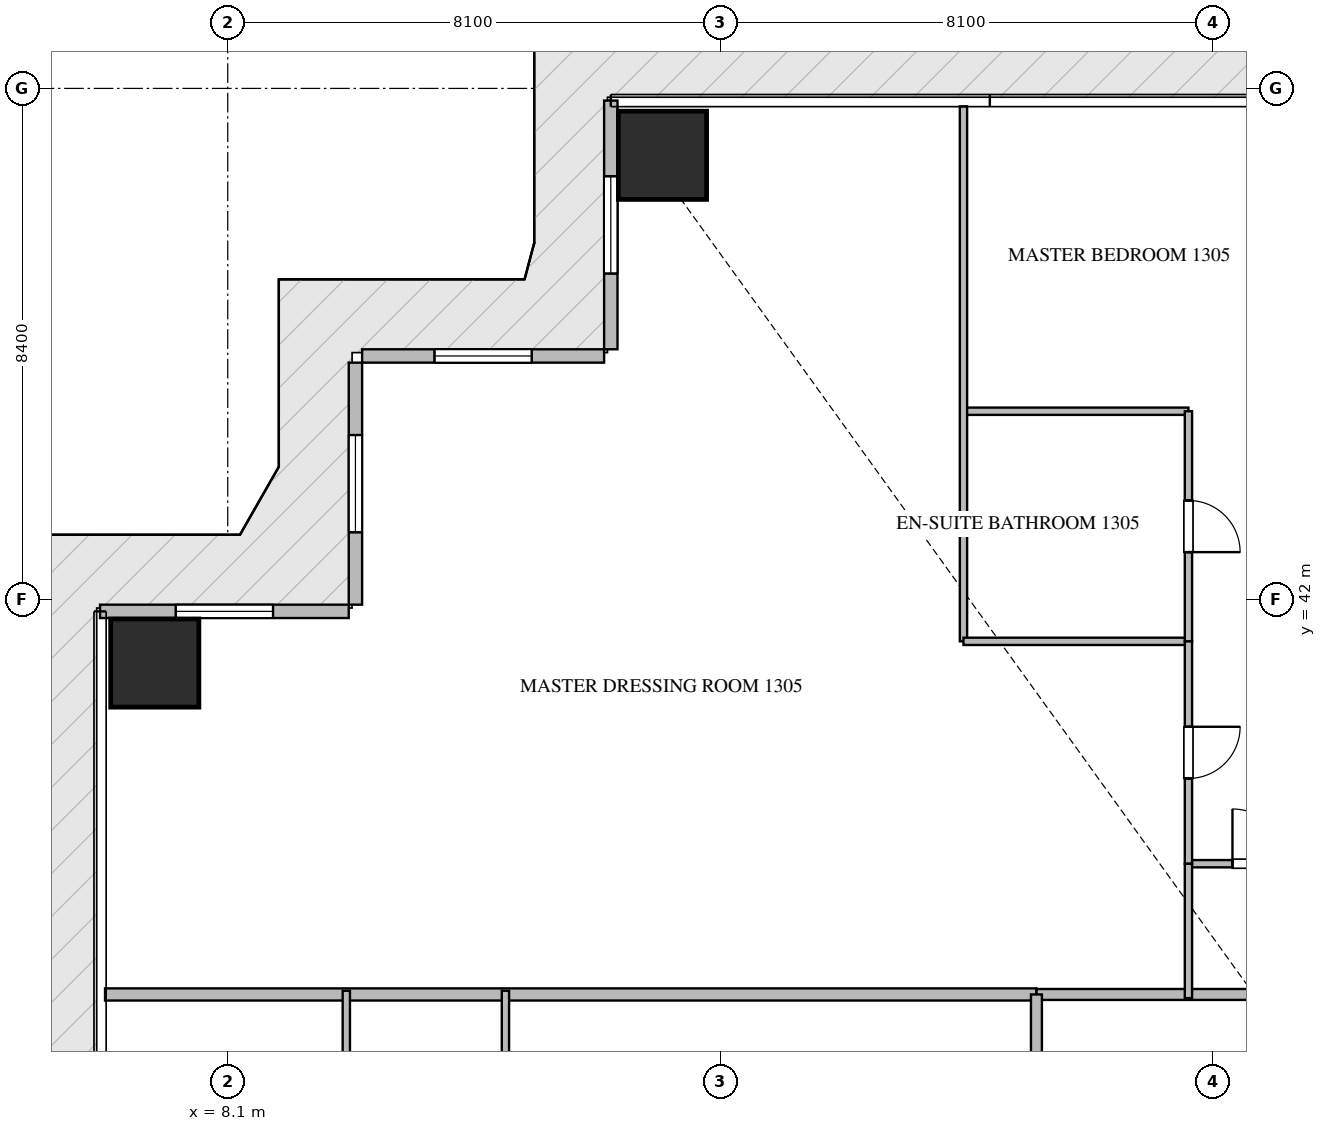
"""IFC4 building model, lengths in metres.
Left out: names, types, materials, properties, quantities, classifications, styles, units other than length and angle.
Written with IfcOpenShell. Run it as: python <this file> out.ifc"""

import sys

from ifc_helpers import new_model, si_unit, direction, frame, frame_2d, origin, origin_2d, place, context, subcontext, project, spatial, rectangle, extrude, source, transform, mapped, element, fill, save


model = new_model("IFC4")
c1 = context("Model", 3, precision=1e-05, world=origin(), true_north=direction((0.0, 1.0)))
c2 = subcontext(c1, "Body", "Model", "MODEL_VIEW")
j1 = project(units=[si_unit("LENGTHUNIT", "METRE"), si_unit("PLANEANGLEUNIT", "RADIAN")], contexts=[c1])
p1 = place(None, origin())
s1 = spatial("IfcSite", under=j1, at=p1, CompositionType="ELEMENT")
p2 = place(p1, origin())
s2 = spatial("IfcBuilding", under=s1, at=p2, CompositionType="ELEMENT")
p3 = place(p2, frame((0.0, 0.0, 56.7)))
s3 = spatial("IfcBuildingStorey", under=s2, at=p3, CompositionType="ELEMENT", Elevation=56.7)
m1 = source(origin(), c2, "Body", "SweptSolid", [
    extrude(rectangle(XDim=1.45, YDim=1.45, at=origin_2d()), origin(), (0.0, 0.0, 1.0), 3.75),
])
for number, where, z_axis, x_axis in (
    (1, (15.25, 49.3, -0.26), (0.0, 0.0, 1.0), (1.0, 0.0, 0.0)),
    (2, (6.9, 40.95, -0.26), (0.0, 0.0, 1.0), (1.0, 0.0, 0.0)),
):
    element("IfcColumn", number, at=place(p3, frame(where, z_axis=z_axis, x_axis=x_axis)), inside=s3, PredefinedType="COLUMN", context=c2, shape_type="MappedRepresentation", body=[
        mapped(m1, transform((0.0, 0.0, 0.0), scale=1.0)),
    ])
p4 = place(p3, frame((14.4, 50.2, 0.0), z_axis=(0.0, 0.0, 1.0), x_axis=(0.0, -1.0, 0.0)))
e3 = element("IfcWall", 3, at=p4, inside=s3, PredefinedType="ELEMENTEDWALL", context=c2, shape_type="SweptSolid", body=[
    extrude(rectangle(XDim=4.09, YDim=0.22, at=frame_2d((2.045, 0.0))), origin(), (0.0, 0.0, 1.0), 3.475),
])
p5 = place(p4, frame((1.245, 0.0, 0.65)))
e4 = element("IfcOpeningElement", 4, at=p5, cuts=e3, PredefinedType="OPENING", context=c2, shape_type="SweptSolid", body=[
    extrude(rectangle(XDim=1.6, YDim=2.1, at=frame_2d((0.8, 1.05))), frame((0.0, 0.12, 0.0), z_axis=(0.0, -1.0, 0.0), x_axis=(1.0, 0.0, 0.0)), (0.0, 0.0, 1.0), 0.24),
])
p6 = place(p3, frame((14.29, 46.0, 0.0), z_axis=(0.0, 0.0, 1.0), x_axis=(-1.0, 0.0, 0.0)))
e5 = element("IfcWall", 5, at=p6, inside=s3, PredefinedType="ELEMENTEDWALL", context=c2, shape_type="SweptSolid", body=[
    extrude(rectangle(XDim=3.98, YDim=0.22, at=frame_2d((1.99, 0.0))), origin(), (0.0, 0.0, 1.0), 3.475),
])
p7 = place(p6, frame((1.19, 0.0, 0.65)))
e6 = element("IfcOpeningElement", 6, at=p7, cuts=e5, PredefinedType="OPENING", context=c2, shape_type="SweptSolid", body=[
    extrude(rectangle(XDim=1.6, YDim=2.1, at=frame_2d((0.8, 1.05))), frame((0.0, 0.12, 0.0), z_axis=(0.0, -1.0, 0.0), x_axis=(1.0, 0.0, 0.0)), (0.0, 0.0, 1.0), 0.24),
])
p8 = place(p3, frame((10.2, 45.89, 0.0), z_axis=(0.0, 0.0, 1.0), x_axis=(0.0, -1.0, 0.0)))
e7 = element("IfcWall", 7, at=p8, inside=s3, PredefinedType="ELEMENTEDWALL", context=c2, shape_type="SweptSolid", body=[
    extrude(rectangle(XDim=3.98, YDim=0.22, at=frame_2d((1.99, 0.0))), origin(), (0.0, 0.0, 1.0), 3.475),
])
p9 = place(p8, frame((1.19, 0.0, 0.65)))
e8 = element("IfcOpeningElement", 8, at=p9, cuts=e7, PredefinedType="OPENING", context=c2, shape_type="SweptSolid", body=[
    extrude(rectangle(XDim=1.6, YDim=2.1, at=frame_2d((0.8, 1.05))), frame((0.0, 0.12, 0.0), z_axis=(0.0, -1.0, 0.0), x_axis=(1.0, 0.0, 0.0)), (0.0, 0.0, 1.0), 0.24),
])
p10 = place(p3, frame((10.09, 41.8, 0.0), z_axis=(0.0, 0.0, 1.0), x_axis=(-1.0, 0.0, 0.0)))
e9 = element("IfcWall", 9, at=p10, inside=s3, PredefinedType="ELEMENTEDWALL", context=c2, shape_type="SweptSolid", body=[
    extrude(rectangle(XDim=4.09, YDim=0.22, at=frame_2d((2.045, 0.0))), origin(), (0.0, 0.0, 1.0), 3.475),
])
p11 = place(p10, frame((1.245, 0.0, 0.65)))
e10 = element("IfcOpeningElement", 10, at=p11, cuts=e9, PredefinedType="OPENING", context=c2, shape_type="SweptSolid", body=[
    extrude(rectangle(XDim=1.6, YDim=2.1, at=frame_2d((0.8, 1.05))), frame((0.0, 0.12, 0.0), z_axis=(0.0, -1.0, 0.0), x_axis=(1.0, 0.0, 0.0)), (0.0, 0.0, 1.0), 0.24),
])
p12 = place(p3, frame((6.082, 35.5, 0.0), z_axis=(0.0, 0.0, 1.0), x_axis=(1.0, 0.0, 0.0)))
e11 = element("IfcWall", 11, at=p12, inside=s3, PredefinedType="PARTITIONING", context=c2, shape_type="SweptSolid", body=[
    extrude(rectangle(XDim=15.318, YDim=0.2, at=frame_2d((7.659, 0.0))), origin(), (0.0, 0.0, 1.0), 3.49),
])
p13 = place(p3, frame((21.402, 35.5, 0.0), z_axis=(0.0, 0.0, 1.0), x_axis=(1.0, 0.0, 0.0)))
e12 = element("IfcWall", 12, at=p13, inside=s3, PredefinedType="PARTITIONING", context=c2, shape_type="SweptSolid", body=[
    extrude(rectangle(XDim=21.996, YDim=0.18, at=frame_2d((10.998, 0.0))), origin(), (0.0, 0.0, 1.0), 3.49),
])
p14 = place(p13, frame((15.222, 0.0, 0.0)))
e13 = element("IfcOpeningElement", 13, at=p14, cuts=e12, PredefinedType="OPENING", context=c2, shape_type="SweptSolid", body=[
    extrude(rectangle(XDim=1.0, YDim=2.15, at=frame_2d((0.5, 1.075))), frame((0.0, 0.1, 0.0), z_axis=(0.0, -1.0, 0.0), x_axis=(1.0, 0.0, 0.0)), (0.0, 0.0, 1.0), 0.2),
])
p15 = place(p3, frame((21.4, 14.9, 0.0), z_axis=(0.0, 0.0, 1.0), x_axis=(0.0, 1.0, 0.0)))
e14 = element("IfcWall", 14, at=p15, inside=s3, PredefinedType="PARTITIONING", context=c2, shape_type="SweptSolid", body=[
    extrude(rectangle(XDim=20.6, YDim=0.18, at=frame_2d((10.3, 0.0))), origin(), (0.0, 0.0, 1.0), 3.49),
])
p16 = place(p15, frame((1.96, 0.0, 0.0)))
e15 = element("IfcOpeningElement", 15, at=p16, cuts=e14, PredefinedType="OPENING", context=c2, shape_type="SweptSolid", body=[
    extrude(rectangle(XDim=1.0, YDim=2.15, at=frame_2d((0.5, 1.075))), frame((0.0, 0.1, 0.0), z_axis=(0.0, -1.0, 0.0), x_axis=(1.0, 0.0, 0.0)), (0.0, 0.0, 1.0), 0.2),
])
p17 = place(p3, frame((23.9, 37.65, 0.0), z_axis=(0.0, 0.0, 1.0), x_axis=(1.0, 0.0, 0.0)))
e16 = element("IfcWall", 16, at=p17, inside=s3, PredefinedType="PARTITIONING", context=c2, shape_type="SweptSolid", body=[
    extrude(rectangle(XDim=2.348, YDim=0.12, at=frame_2d((1.174, 0.0))), origin(), (0.0, 0.0, 1.0), 3.49),
])
p18 = place(p17, frame((0.724, 0.0, 0.0)))
e17 = element("IfcOpeningElement", 17, at=p18, cuts=e16, PredefinedType="OPENING", context=c2, shape_type="SweptSolid", body=[
    extrude(rectangle(XDim=0.9, YDim=2.1, at=frame_2d((0.45, 1.05))), frame((0.0, 0.07, 0.0), z_axis=(0.0, -1.0, 0.0), x_axis=(1.0, 0.0, 0.0)), (0.0, 0.0, 1.0), 0.14),
])
p19 = place(p3, frame((20.2, 45.091, 0.0), z_axis=(0.0, 0.0, 1.0), x_axis=(1.0, 0.0, 0.0)))
e18 = element("IfcWall", 18, at=p19, inside=s3, PredefinedType="PARTITIONING", context=c2, shape_type="SweptSolid", body=[
    extrude(rectangle(XDim=3.7, YDim=0.12, at=frame_2d((1.85, 0.0))), origin(), (0.0, 0.0, 1.0), 3.49),
])
p20 = place(p3, frame((20.2, 50.105, 0.0), z_axis=(0.0, 0.0, 1.0), x_axis=(0.0, -1.0, 0.0)))
e19 = element("IfcWall", 19, at=p20, inside=s3, PredefinedType="PARTITIONING", context=c2, shape_type="SweptSolid", body=[
    extrude(rectangle(XDim=8.798, YDim=0.12, at=frame_2d((4.399, 0.0))), origin(), (0.0, 0.0, 1.0), 3.49),
])
p21 = place(p3, frame((20.2, 41.307, 0.0), z_axis=(0.0, 0.0, 1.0), x_axis=(1.0, 0.0, 0.0)))
e20 = element("IfcWall", 20, at=p21, inside=s3, PredefinedType="PARTITIONING", context=c2, shape_type="SweptSolid", body=[
    extrude(rectangle(XDim=3.7, YDim=0.12, at=frame_2d((1.85, 0.0))), origin(), (0.0, 0.0, 1.0), 3.49),
])
p22 = place(p3, frame((23.9, 45.091, 0.0), z_axis=(0.0, 0.0, 1.0), x_axis=(0.0, -1.0, 0.0)))
e21 = element("IfcWall", 21, at=p22, inside=s3, PredefinedType="PARTITIONING", context=c2, shape_type="SweptSolid", body=[
    extrude(rectangle(XDim=3.784, YDim=0.12, at=frame_2d((1.892, 0.0))), origin(), (0.0, 0.0, 1.0), 3.49),
])
p23 = place(p22, frame((1.467, 0.0, 0.0)))
e22 = element("IfcOpeningElement", 22, at=p23, cuts=e21, PredefinedType="OPENING", context=c2, shape_type="SweptSolid", body=[
    extrude(rectangle(XDim=0.85, YDim=2.1, at=frame_2d((0.425, 1.05))), frame((0.0, 0.07, 0.0), z_axis=(0.0, -1.0, 0.0), x_axis=(1.0, 0.0, 0.0)), (0.0, 0.0, 1.0), 0.14),
])
p24 = place(p3, frame((23.9, 41.305, 0.0), z_axis=(0.0, 0.0, 1.0), x_axis=(0.0, -1.0, 0.0)))
e23 = element("IfcWall", 23, at=p24, inside=s3, PredefinedType="PARTITIONING", context=c2, shape_type="SweptSolid", body=[
    extrude(rectangle(XDim=3.655, YDim=0.12, at=frame_2d((1.828, 0.0))), origin(), (0.0, 0.0, 1.0), 3.49),
])
p25 = place(p24, frame((1.403, 0.0, 0.0)))
e24 = element("IfcOpeningElement", 24, at=p25, cuts=e23, PredefinedType="OPENING", context=c2, shape_type="SweptSolid", body=[
    extrude(rectangle(XDim=0.85, YDim=2.1, at=frame_2d((0.425, 1.05))), frame((0.0, 0.07, 0.0), z_axis=(0.0, -1.0, 0.0), x_axis=(1.0, 0.0, 0.0)), (0.0, 0.0, 1.0), 0.14),
])
p26 = place(p3, frame((23.9, 37.648, 0.0), z_axis=(0.0, 0.0, 1.0), x_axis=(0.0, -1.0, 0.0)))
e25 = element("IfcWall", 25, at=p26, inside=s3, PredefinedType="PARTITIONING", context=c2, shape_type="SweptSolid", body=[
    extrude(rectangle(XDim=2.208, YDim=0.12, at=frame_2d((1.104, 0.0))), origin(), (0.0, 0.0, 1.0), 3.49),
])
for number, where, z_axis, x_axis in (
    (26, (10.05, 30.15, 0.0), (0.0, 0.0, 1.0), (0.0, 1.0, 0.0)),
    (27, (12.667, 30.15, 0.0), (0.0, 0.0, 1.0), (0.0, 1.0, 0.0)),
):
    element("IfcWall", number, at=place(p3, frame(where, z_axis=z_axis, x_axis=x_axis)), inside=s3, PredefinedType="PARTITIONING", context=c2, shape_type="SweptSolid", body=[
        extrude(rectangle(XDim=5.41, YDim=0.12, at=frame_2d((2.705, 0.0))), origin(), (0.0, 0.0, 1.0), 3.49),
    ])
m2 = source(origin(), c2, "Body", "SweptSolid", [
    extrude(rectangle(XDim=1.6, YDim=2.1, at=frame_2d((0.8, 1.05))), frame((0.0, 0.03, 0.0), z_axis=(0.0, -1.0, 0.0), x_axis=(1.0, 0.0, 0.0)), (0.0, 0.0, 1.0), 0.06),
])
p27 = place(p5, origin())
e28 = element("IfcWindow", 28, at=p27, inside=s3, PartitioningType="SINGLE_PANEL", PredefinedType="WINDOW", context=c2, shape_type="MappedRepresentation", body=[
    mapped(m2, transform((0.0, 0.0, 0.0), scale=1.0)),
])
fill(e4, e28)
p28 = place(p7, origin())
e29 = element("IfcWindow", 29, at=p28, inside=s3, PartitioningType="SINGLE_PANEL", PredefinedType="WINDOW", context=c2, shape_type="MappedRepresentation", body=[
    mapped(m2, transform((0.0, 0.0, 0.0), scale=1.0)),
])
fill(e6, e29)
p29 = place(p9, origin())
e30 = element("IfcWindow", 30, at=p29, inside=s3, PartitioningType="SINGLE_PANEL", PredefinedType="WINDOW", context=c2, shape_type="MappedRepresentation", body=[
    mapped(m2, transform((0.0, 0.0, 0.0), scale=1.0)),
])
fill(e8, e30)
p30 = place(p11, origin())
e31 = element("IfcWindow", 31, at=p30, inside=s3, PartitioningType="SINGLE_PANEL", PredefinedType="WINDOW", context=c2, shape_type="MappedRepresentation", body=[
    mapped(m2, transform((0.0, 0.0, 0.0), scale=1.0)),
])
fill(e10, e31)
m3 = source(origin(), c2, "Body", "SweptSolid", [
    extrude(rectangle(XDim=0.9, YDim=2.1, at=frame_2d((0.45, 1.05))), frame((0.0, 0.025, 0.0), z_axis=(0.0, -1.0, 0.0), x_axis=(1.0, 0.0, 0.0)), (0.0, 0.0, 1.0), 0.05),
])
p31 = place(p18, origin())
e32 = element("IfcDoor", 32, at=p31, inside=s3, OperationType="SINGLE_SWING_LEFT", PredefinedType="DOOR", context=c2, shape_type="MappedRepresentation", body=[
    mapped(m3, transform((0.0, 0.0, 0.0), scale=1.0)),
])
fill(e17, e32)
m4 = source(origin(), c2, "Body", "SweptSolid", [
    extrude(rectangle(XDim=0.85, YDim=2.1, at=frame_2d((0.425, 1.05))), frame((0.0, 0.025, 0.0), z_axis=(0.0, -1.0, 0.0), x_axis=(1.0, 0.0, 0.0)), (0.0, 0.0, 1.0), 0.05),
])
p32 = place(p23, origin())
e33 = element("IfcDoor", 33, at=p32, inside=s3, OperationType="SINGLE_SWING_RIGHT", PredefinedType="DOOR", context=c2, shape_type="MappedRepresentation", body=[
    mapped(m4, transform((0.0, 0.0, 0.0), scale=1.0)),
])
fill(e22, e33)
p33 = place(p25, origin())
e34 = element("IfcDoor", 34, at=p33, inside=s3, OperationType="SINGLE_SWING_LEFT", PredefinedType="DOOR", context=c2, shape_type="MappedRepresentation", body=[
    mapped(m4, transform((0.0, 0.0, 0.0), scale=1.0)),
])
fill(e24, e34)
save(model, sys.argv[1])
